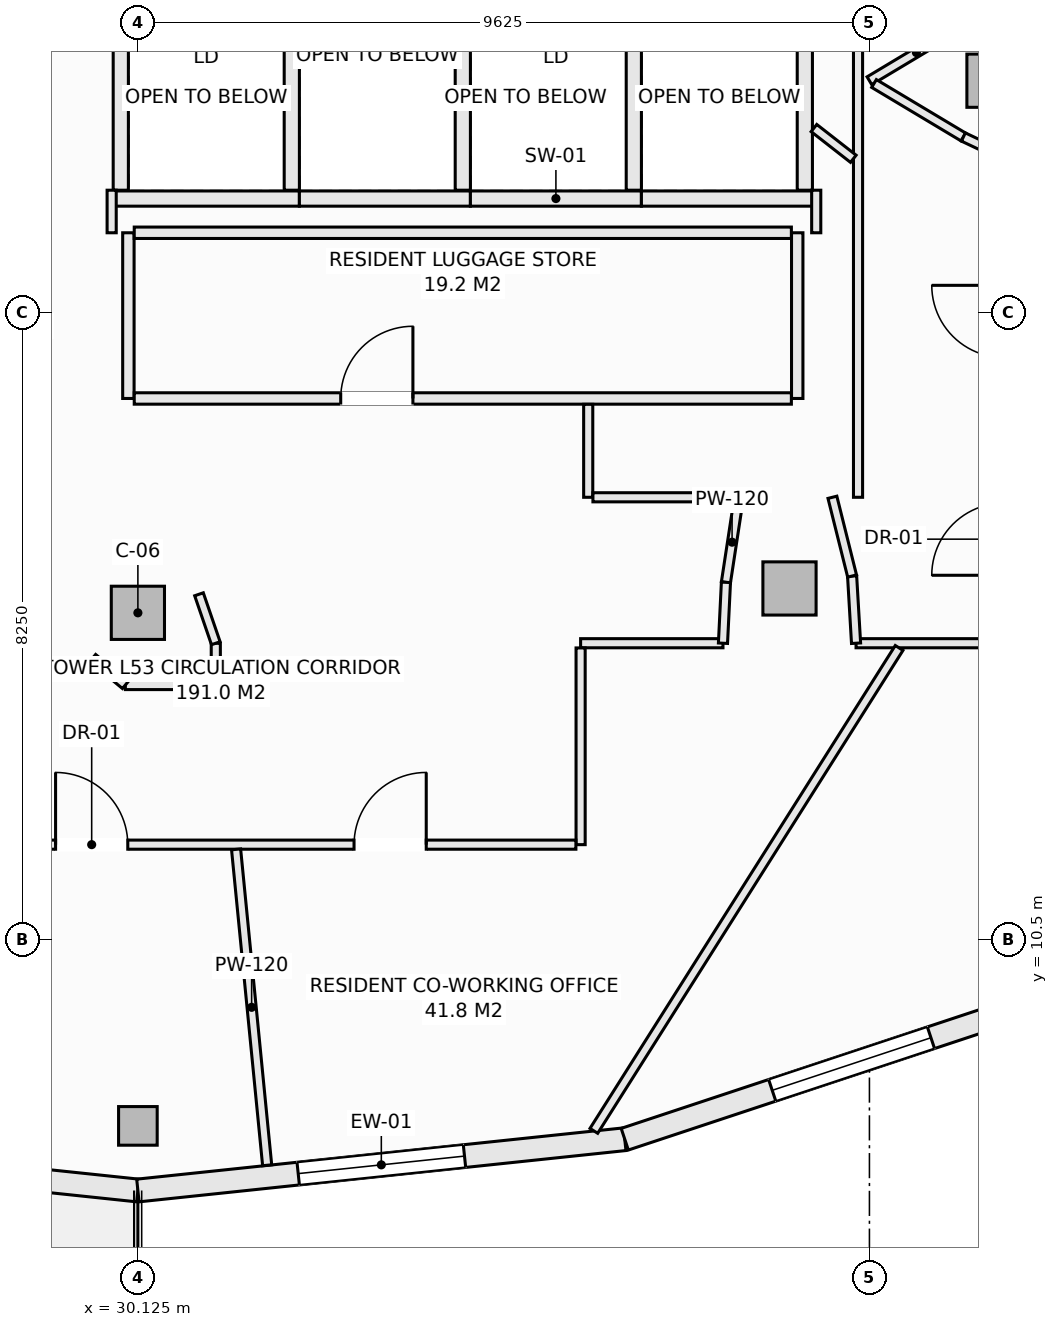
"""IFC4 building model, lengths in metres.
Left out: names, types, materials, properties, quantities, classifications, styles, units other than length and angle.
Written with IfcOpenShell. Run it as: python <this file> out.ifc"""

import sys

from ifc_helpers import new_model, si_unit, direction, frame, frame_2d, origin, origin_2d, place, context, subcontext, project, spatial, rectangle, hollow_rectangle, extrude, element, fill, save


model = new_model("IFC4")
c1 = context("Model", 3, precision=1e-05, world=origin(), true_north=direction((0.0, 1.0)))
c2 = subcontext(c1, "Body", "Model", "MODEL_VIEW")
j1 = project(units=[si_unit("LENGTHUNIT", "METRE"), si_unit("PLANEANGLEUNIT", "RADIAN")], contexts=[c1])
p1 = place(None, origin())
s1 = spatial("IfcSite", under=j1, at=p1, CompositionType="ELEMENT")
p2 = place(p1, origin())
s2 = spatial("IfcBuilding", under=s1, at=p2, CompositionType="ELEMENT")
p3 = place(p2, frame((0.0, 0.0, 203.0)))
s3 = spatial("IfcBuildingStorey", under=s2, at=p3, CompositionType="ELEMENT", Elevation=203.0)
p4 = place(p3, frame((30.125, 8.05, -0.27), z_axis=(0.0, 0.0, 1.0), x_axis=(1.0, 0.0, 0.0)))
e1 = element("IfcColumn", 1, at=p4, inside=s3, PredefinedType="COLUMN", context=c2, shape_type="SweptSolid", body=[
    extrude(hollow_rectangle(XDim=0.508, YDim=0.508, WallThickness=0.019, at=origin_2d()), origin(), (0.0, 0.0, 1.0), 3.3),
])
for number, where, z_axis, x_axis in (
    (2, (30.125, 14.8, -0.27), (0.0, 0.0, 1.0), (1.0, 0.0, 0.0)),
    (3, (38.698, 15.121, -0.27), (0.0, 0.0, 1.0), (1.0, 0.0, 0.0)),
    (4, (41.382, 21.801, -0.27), (0.0, 0.0, 1.0), (1.0, 0.0, 0.0)),
):
    element("IfcColumn", number, at=place(p3, frame(where, z_axis=z_axis, x_axis=x_axis)), inside=s3, PredefinedType="COLUMN", context=c2, shape_type="SweptSolid", body=[
        extrude(rectangle(XDim=0.7, YDim=0.7, at=origin_2d()), origin(), (0.0, 0.0, 1.0), 3.3),
    ])
p5 = place(p3, frame((23.719, 7.875, 0.0), z_axis=(0.0, 0.0, 1.0), x_axis=(0.994497142298, -0.104763705363, 0.0)))
e5 = element("IfcWall", 5, at=p5, inside=s3, PredefinedType="SOLIDWALL", context=c2, shape_type="SweptSolid", body=[
    extrude(rectangle(XDim=6.441, YDim=0.3, at=frame_2d((3.221, 0.0))), origin(), (0.0, 0.0, 1.0), 2.605),
])
p6 = place(p5, frame((2.121, 0.0, 0.72)))
e6 = element("IfcOpeningElement", 6, at=p6, cuts=e5, PredefinedType="OPENING", context=c2, shape_type="SweptSolid", body=[
    extrude(rectangle(XDim=2.2, YDim=1.65, at=frame_2d((1.1, 0.825))), frame((0.0, 0.16, 0.0), z_axis=(0.0, -1.0, 0.0), x_axis=(1.0, 0.0, 0.0)), (0.0, 0.0, 1.0), 0.32),
])
p7 = place(p3, frame((30.125, 7.2, 0.0), z_axis=(0.0, 0.0, 1.0), x_axis=(0.994497142298, 0.104763705363, 0.0)))
e7 = element("IfcWall", 7, at=p7, inside=s3, PredefinedType="SOLIDWALL", context=c2, shape_type="SweptSolid", body=[
    extrude(rectangle(XDim=6.441, YDim=0.3, at=frame_2d((3.221, 0.0))), origin(), (0.0, 0.0, 1.0), 2.605),
])
p8 = place(p7, frame((2.121, 0.0, 0.72)))
e8 = element("IfcOpeningElement", 8, at=p8, cuts=e7, PredefinedType="OPENING", context=c2, shape_type="SweptSolid", body=[
    extrude(rectangle(XDim=2.2, YDim=1.65, at=frame_2d((1.1, 0.825))), frame((0.0, 0.16, 0.0), z_axis=(0.0, -1.0, 0.0), x_axis=(1.0, 0.0, 0.0)), (0.0, 0.0, 1.0), 0.32),
])
p9 = place(p3, frame((36.531, 7.875, 0.0), z_axis=(0.0, 0.0, 1.0), x_axis=(0.949240877604, 0.314550085495, 0.0)))
e9 = element("IfcWall", 9, at=p9, inside=s3, PredefinedType="SOLIDWALL", context=c2, shape_type="SweptSolid", body=[
    extrude(rectangle(XDim=6.288, YDim=0.3, at=frame_2d((3.144, 0.0))), origin(), (0.0, 0.0, 1.0), 2.605),
])
p10 = place(p9, frame((2.044, 0.0, 0.72)))
e10 = element("IfcOpeningElement", 10, at=p10, cuts=e9, PredefinedType="OPENING", context=c2, shape_type="SweptSolid", body=[
    extrude(rectangle(XDim=2.2, YDim=1.65, at=frame_2d((1.1, 0.825))), frame((0.0, 0.16, 0.0), z_axis=(0.0, -1.0, 0.0), x_axis=(1.0, 0.0, 0.0)), (0.0, 0.0, 1.0), 0.32),
])
p11 = place(p3, frame((29.8, 20.25, 0.0), z_axis=(0.0, 0.0, 1.0), x_axis=(1.0, 0.0, 0.0)))
e11 = element("IfcWall", 11, at=p11, inside=s3, PredefinedType="SOLIDWALL", context=c2, shape_type="SweptSolid", body=[
    extrude(rectangle(XDim=2.45, YDim=0.2, at=frame_2d((1.225, 0.0))), origin(), (0.0, 0.0, 1.0), 3.03),
])
for number, where, z_axis, x_axis in (
    (12, (29.9, 20.36, 0.0), (0.0, 0.0, 1.0), (0.0, 1.0, 0.0)),
    (13, (32.15, 20.36, 0.0), (0.0, 0.0, 1.0), (0.0, 1.0, 0.0)),
):
    element("IfcWall", number, at=place(p3, frame(where, z_axis=z_axis, x_axis=x_axis)), inside=s3, PredefinedType="SOLIDWALL", context=c2, shape_type="SweptSolid", body=[
        extrude(rectangle(XDim=2.43, YDim=0.2, at=frame_2d((1.215, 0.0))), origin(), (0.0, 0.0, 1.0), 3.03),
    ])
p12 = place(p3, frame((32.25, 20.25, 0.0), z_axis=(0.0, 0.0, 1.0), x_axis=(1.0, 0.0, 0.0)))
e14 = element("IfcWall", 14, at=p12, inside=s3, PredefinedType="SOLIDWALL", context=c2, shape_type="SweptSolid", body=[
    extrude(rectangle(XDim=2.25, YDim=0.2, at=frame_2d((1.125, 0.0))), origin(), (0.0, 0.0, 1.0), 3.03),
])
p13 = place(p3, frame((34.4, 20.36, 0.0), z_axis=(0.0, 0.0, 1.0), x_axis=(0.0, 1.0, 0.0)))
e15 = element("IfcWall", 15, at=p13, inside=s3, PredefinedType="SOLIDWALL", context=c2, shape_type="SweptSolid", body=[
    extrude(rectangle(XDim=2.43, YDim=0.2, at=frame_2d((1.215, 0.0))), origin(), (0.0, 0.0, 1.0), 3.03),
])
p14 = place(p3, frame((34.5, 20.25, 0.0), z_axis=(0.0, 0.0, 1.0), x_axis=(1.0, 0.0, 0.0)))
e16 = element("IfcWall", 16, at=p14, inside=s3, PredefinedType="SOLIDWALL", context=c2, shape_type="SweptSolid", body=[
    extrude(rectangle(XDim=2.25, YDim=0.2, at=frame_2d((1.125, 0.0))), origin(), (0.0, 0.0, 1.0), 3.03),
])
p15 = place(p3, frame((36.65, 20.36, 0.0), z_axis=(0.0, 0.0, 1.0), x_axis=(0.0, 1.0, 0.0)))
e17 = element("IfcWall", 17, at=p15, inside=s3, PredefinedType="SOLIDWALL", context=c2, shape_type="SweptSolid", body=[
    extrude(rectangle(XDim=2.43, YDim=0.2, at=frame_2d((1.215, 0.0))), origin(), (0.0, 0.0, 1.0), 3.03),
])
p16 = place(p3, frame((36.75, 20.25, 0.0), z_axis=(0.0, 0.0, 1.0), x_axis=(1.0, 0.0, 0.0)))
e18 = element("IfcWall", 18, at=p16, inside=s3, PredefinedType="SOLIDWALL", context=c2, shape_type="SweptSolid", body=[
    extrude(rectangle(XDim=2.25, YDim=0.2, at=frame_2d((1.125, 0.0))), origin(), (0.0, 0.0, 1.0), 3.03),
])
p17 = place(p3, frame((38.9, 20.36, 0.0), z_axis=(0.0, 0.0, 1.0), x_axis=(0.0, 1.0, 0.0)))
e19 = element("IfcWall", 19, at=p17, inside=s3, PredefinedType="SOLIDWALL", context=c2, shape_type="SweptSolid", body=[
    extrude(rectangle(XDim=2.43, YDim=0.2, at=frame_2d((1.215, 0.0))), origin(), (0.0, 0.0, 1.0), 3.03),
])
for number, where, z_axis, x_axis in (
    (20, (30.0, 17.62, 0.0), (0.0, 0.0, 1.0), (0.0, 1.0, 0.0)),
    (21, (38.8, 17.62, 0.0), (0.0, 0.0, 1.0), (0.0, 1.0, 0.0)),
):
    element("IfcWall", number, at=place(p3, frame(where, z_axis=z_axis, x_axis=x_axis)), inside=s3, PredefinedType="PARTITIONING", context=c2, shape_type="SweptSolid", body=[
        extrude(rectangle(XDim=2.18, YDim=0.15, at=frame_2d((1.09, 0.0))), origin(), (0.0, 0.0, 1.0), 3.03),
    ])
p18 = place(p3, frame((30.077, 17.62, 0.0), z_axis=(0.0, 0.0, 1.0), x_axis=(1.0, 0.0, 0.0)))
e22 = element("IfcWall", 22, at=p18, inside=s3, PredefinedType="PARTITIONING", context=c2, shape_type="SweptSolid", body=[
    extrude(rectangle(XDim=8.646, YDim=0.15, at=frame_2d((4.323, 0.0))), origin(), (0.0, 0.0, 1.0), 3.03),
])
p19 = place(p18, frame((2.717, 0.0, 0.0)))
e23 = element("IfcOpeningElement", 23, at=p19, cuts=e22, PredefinedType="OPENING", context=c2, shape_type="SweptSolid", body=[
    extrude(rectangle(XDim=0.95, YDim=2.1, at=frame_2d((0.475, 1.05))), frame((0.0, 0.085, 0.0), z_axis=(0.0, -1.0, 0.0), x_axis=(1.0, 0.0, 0.0)), (0.0, 0.0, 1.0), 0.17),
])
p20 = place(p3, frame((30.077, 19.8, 0.0), z_axis=(0.0, 0.0, 1.0), x_axis=(1.0, 0.0, 0.0)))
e24 = element("IfcWall", 24, at=p20, inside=s3, PredefinedType="PARTITIONING", context=c2, shape_type="SweptSolid", body=[
    extrude(rectangle(XDim=8.646, YDim=0.15, at=frame_2d((4.323, 0.0))), origin(), (0.0, 0.0, 1.0), 3.03),
])
p21 = place(p3, frame((39.05, 19.8, 0.0), z_axis=(0.0, 0.0, 1.0), x_axis=(0.0, 1.0, 0.0)))
e25 = element("IfcWall", 25, at=p21, inside=s3, PredefinedType="PARTITIONING", context=c2, shape_type="SweptSolid", body=[
    extrude(rectangle(XDim=0.56, YDim=0.12, at=frame_2d((0.28, 0.0))), origin(), (0.0, 0.0, 1.0), 3.03),
])
p22 = place(p3, frame((39.6, 16.32, 0.0), z_axis=(0.0, 0.0, 1.0), x_axis=(0.0, 1.0, 0.0)))
e26 = element("IfcWall", 26, at=p22, inside=s3, PredefinedType="PARTITIONING", context=c2, shape_type="SweptSolid", body=[
    extrude(rectangle(XDim=6.7, YDim=0.12, at=frame_2d((3.35, 0.0))), origin(), (0.0, 0.0, 1.0), 2.478),
])
p23 = place(p3, frame((39.75, 21.8, 0.0), z_axis=(0.0, 0.0, 1.0), x_axis=(0.857702120906, 0.514146935996, 0.0)))
e27 = element("IfcWall", 27, at=p23, inside=s3, PredefinedType="PARTITIONING", context=c2, shape_type="SweptSolid", body=[
    extrude(rectangle(XDim=1.441, YDim=0.12, at=frame_2d((0.721, 0.0))), origin(), (0.0, 0.0, 1.0), 3.03),
])
p24 = place(p3, frame((39.81, 21.764, 0.0), z_axis=(0.0, 0.0, 1.0), x_axis=(0.858011245414, -0.513630901273, 0.0)))
e28 = element("IfcWall", 28, at=p24, inside=s3, PredefinedType="PARTITIONING", context=c2, shape_type="SweptSolid", body=[
    extrude(rectangle(XDim=1.37, YDim=0.12, at=frame_2d((0.685, 0.0))), origin(), (0.0, 0.0, 1.0), 3.03),
])
p25 = place(p3, frame((40.986, 21.06, 0.0), z_axis=(0.0, 0.0, 1.0), x_axis=(0.90356951601, -0.428441512621, 0.0)))
e29 = element("IfcWall", 29, at=p25, inside=s3, PredefinedType="PARTITIONING", context=c2, shape_type="SweptSolid", body=[
    extrude(rectangle(XDim=0.591, YDim=0.12, at=frame_2d((0.295, 0.0))), origin(), (0.0, 0.0, 1.0), 3.03),
])
p26 = place(p3, frame((35.95, 14.4, 0.0), z_axis=(0.0, 0.0, 1.0), x_axis=(1.0, 0.0, 0.0)))
e30 = element("IfcWall", 30, at=p26, inside=s3, PredefinedType="PARTITIONING", context=c2, shape_type="SweptSolid", body=[
    extrude(rectangle(XDim=1.873, YDim=0.12, at=frame_2d((0.937, 0.0))), origin(), (0.0, 0.0, 1.0), 3.03),
])
p27 = place(p3, frame((39.574, 14.4, 0.0), z_axis=(0.0, 0.0, 1.0), x_axis=(1.0, 0.0, 0.0)))
e31 = element("IfcWall", 31, at=p27, inside=s3, PredefinedType="PARTITIONING", context=c2, shape_type="SweptSolid", body=[
    extrude(rectangle(XDim=1.884, YDim=0.12, at=frame_2d((0.942, 0.0))), origin(), (0.0, 0.0, 1.0), 3.03),
])
p28 = place(p3, frame((39.522, 15.284, 0.0), z_axis=(0.0, 0.0, 1.0), x_axis=(0.058722021951, -0.998274373175, 0.0)))
e32 = element("IfcWall", 32, at=p28, inside=s3, PredefinedType="PARTITIONING", context=c2, shape_type="SweptSolid", body=[
    extrude(rectangle(XDim=0.885, YDim=0.12, at=frame_2d((0.443, 0.0))), origin(), (0.0, 0.0, 1.0), 3.03),
])
p29 = place(p3, frame((39.263, 16.32, 0.0), z_axis=(0.0, 0.0, 1.0), x_axis=(0.242535625036, -0.970142500145, 0.0)))
e33 = element("IfcWall", 33, at=p29, inside=s3, PredefinedType="PARTITIONING", context=c2, shape_type="SweptSolid", body=[
    extrude(rectangle(XDim=1.068, YDim=0.12, at=frame_2d((0.534, 0.0))), origin(), (0.0, 0.0, 1.0), 2.478),
])
p30 = place(p3, frame((29.78, 19.8, 0.0), z_axis=(0.0, 0.0, 1.0), x_axis=(0.0, 1.0, 0.0)))
e34 = element("IfcWall", 34, at=p30, inside=s3, PredefinedType="PARTITIONING", context=c2, shape_type="SweptSolid", body=[
    extrude(rectangle(XDim=0.56, YDim=0.12, at=frame_2d((0.28, 0.0))), origin(), (0.0, 0.0, 1.0), 3.03),
])
p31 = place(p3, frame((36.05, 16.32, 0.0), z_axis=(0.0, 0.0, 1.0), x_axis=(0.0, 1.0, 0.0)))
e35 = element("IfcWall", 35, at=p31, inside=s3, PredefinedType="PARTITIONING", context=c2, shape_type="SweptSolid", body=[
    extrude(rectangle(XDim=1.223, YDim=0.12, at=frame_2d((0.611, 0.0))), origin(), (0.0, 0.0, 1.0), 3.03),
])
p32 = place(p3, frame((36.112, 16.32, 0.0), z_axis=(0.0, 0.0, 1.0), x_axis=(1.0, 0.0, 0.0)))
e36 = element("IfcWall", 36, at=p32, inside=s3, PredefinedType="PARTITIONING", context=c2, shape_type="SweptSolid", body=[
    extrude(rectangle(XDim=1.921, YDim=0.12, at=frame_2d((0.96, 0.0))), origin(), (0.0, 0.0, 1.0), 3.03),
])
p33 = place(p3, frame((37.862, 15.201, 0.0), z_axis=(0.0, 0.0, 1.0), x_axis=(0.150907653202, 0.988547864398, 0.0)))
e37 = element("IfcWall", 37, at=p33, inside=s3, PredefinedType="PARTITIONING", context=c2, shape_type="SweptSolid", body=[
    extrude(rectangle(XDim=1.069, YDim=0.12, at=frame_2d((0.535, 0.0))), origin(), (0.0, 0.0, 1.0), 3.03),
])
p34 = place(p3, frame((37.823, 14.4, 0.0), z_axis=(0.0, 0.0, 1.0), x_axis=(0.04870773904, 0.998813073682, 0.0)))
e38 = element("IfcWall", 38, at=p34, inside=s3, PredefinedType="PARTITIONING", context=c2, shape_type="SweptSolid", body=[
    extrude(rectangle(XDim=0.802, YDim=0.12, at=frame_2d((0.401, 0.0))), origin(), (0.0, 0.0, 1.0), 3.03),
])
p35 = place(p3, frame((35.95, 11.75, 0.0), z_axis=(0.0, 0.0, 1.0), x_axis=(0.0, 1.0, 0.0)))
e39 = element("IfcWall", 39, at=p35, inside=s3, PredefinedType="PARTITIONING", context=c2, shape_type="SweptSolid", body=[
    extrude(rectangle(XDim=2.588, YDim=0.12, at=frame_2d((1.294, 0.0))), origin(), (0.0, 0.0, 1.0), 3.03),
])
p36 = place(p3, frame((27.212, 11.75, 0.0), z_axis=(0.0, 0.0, 1.0), x_axis=(1.0, 0.0, 0.0)))
e40 = element("IfcWall", 40, at=p36, inside=s3, PredefinedType="PARTITIONING", context=c2, shape_type="SweptSolid", body=[
    extrude(rectangle(XDim=8.676, YDim=0.12, at=frame_2d((4.338, 0.0))), origin(), (0.0, 0.0, 1.0), 3.03),
])
p37 = place(p36, frame((1.83, 0.0, 0.0)))
e41 = element("IfcOpeningElement", 41, at=p37, cuts=e40, PredefinedType="OPENING", context=c2, shape_type="SweptSolid", body=[
    extrude(rectangle(XDim=0.95, YDim=2.1, at=frame_2d((0.475, 1.05))), frame((0.0, 0.07, 0.0), z_axis=(0.0, -1.0, 0.0), x_axis=(1.0, 0.0, 0.0)), (0.0, 0.0, 1.0), 0.14),
])
p38 = place(p36, frame((5.757, 0.0, 0.0)))
e42 = element("IfcOpeningElement", 42, at=p38, cuts=e40, PredefinedType="OPENING", context=c2, shape_type="SweptSolid", body=[
    extrude(rectangle(XDim=0.95, YDim=2.1, at=frame_2d((0.475, 1.05))), frame((0.0, 0.07, 0.0), z_axis=(0.0, -1.0, 0.0), x_axis=(1.0, 0.0, 0.0)), (0.0, 0.0, 1.0), 0.14),
])
p39 = place(p3, frame((29.96, 13.85, 0.0), z_axis=(0.0, 0.0, 1.0), x_axis=(1.0, 0.0, 0.0)))
e43 = element("IfcWall", 43, at=p39, inside=s3, PredefinedType="PARTITIONING", context=c2, shape_type="SweptSolid", body=[
    extrude(rectangle(XDim=1.19, YDim=0.12, at=frame_2d((0.595, 0.0))), origin(), (0.0, 0.0, 1.0), 3.03),
])
p40 = place(p3, frame((31.15, 13.912, 0.0), z_axis=(0.0, 0.0, 1.0), x_axis=(0.0, 1.0, 0.0)))
e44 = element("IfcWall", 44, at=p40, inside=s3, PredefinedType="PARTITIONING", context=c2, shape_type="SweptSolid", body=[
    extrude(rectangle(XDim=0.488, YDim=0.12, at=frame_2d((0.244, 0.0))), origin(), (0.0, 0.0, 1.0), 3.03),
])
p41 = place(p3, frame((30.929, 15.044, 0.0), z_axis=(0.0, 0.0, 1.0), x_axis=(0.324498492416, -0.945886213252, 0.0)))
e45 = element("IfcWall", 45, at=p41, inside=s3, PredefinedType="PARTITIONING", context=c2, shape_type="SweptSolid", body=[
    extrude(rectangle(XDim=0.681, YDim=0.12, at=frame_2d((0.34, 0.0))), origin(), (0.0, 0.0, 1.0), 3.03),
])
p42 = place(p3, frame((29.531, 14.206, 0.0), z_axis=(0.0, 0.0, 1.0), x_axis=(0.7695479554, -0.638589026166, 0.0)))
e46 = element("IfcWall", 46, at=p42, inside=s3, PredefinedType="PARTITIONING", context=c2, shape_type="SweptSolid", body=[
    extrude(rectangle(XDim=0.557, YDim=0.12, at=frame_2d((0.279, 0.0))), origin(), (0.0, 0.0, 1.0), 3.03),
])
p43 = place(p3, frame((31.417, 11.688, 0.0), z_axis=(0.0, 0.0, 1.0), x_axis=(0.097923390467, -0.995193955769, 0.0)))
e47 = element("IfcWall", 47, at=p43, inside=s3, PredefinedType="PARTITIONING", context=c2, shape_type="SweptSolid", body=[
    extrude(rectangle(XDim=4.176, YDim=0.12, at=frame_2d((2.088, 0.0))), origin(), (0.0, 0.0, 1.0), 3.03),
])
p44 = place(p3, frame((39.02, 21.178, 0.0), z_axis=(0.0, 0.0, 1.0), x_axis=(0.788170760396, -0.615456621101, 0.0)))
e48 = element("IfcWall", 48, at=p44, inside=s3, PredefinedType="PARTITIONING", context=c2, shape_type="SweptSolid", body=[
    extrude(rectangle(XDim=0.657, YDim=0.12, at=frame_2d((0.329, 0.0))), origin(), (0.0, 0.0, 1.0), 3.03),
])
p45 = place(p3, frame((36.124, 7.985, 0.0), z_axis=(0.0, 0.0, 1.0), x_axis=(0.534397421847, 0.845233337915, 0.0)))
e49 = element("IfcWall", 49, at=p45, inside=s3, PredefinedType="PARTITIONING", context=c2, shape_type="SweptSolid", body=[
    extrude(rectangle(XDim=7.517, YDim=0.12, at=frame_2d((3.758, 0.0))), origin(), (0.0, 0.0, 1.0), 3.03),
])
p46 = place(p8, origin())
e50 = element("IfcWindow", 50, at=p46, inside=s3, PartitioningType="SINGLE_PANEL", PredefinedType="WINDOW", context=c2, shape_type="SweptSolid", body=[
    extrude(rectangle(XDim=2.2, YDim=1.65, at=frame_2d((1.1, 0.825))), frame((0.0, 0.03, 0.0), z_axis=(0.0, -1.0, 0.0), x_axis=(1.0, 0.0, 0.0)), (0.0, 0.0, 1.0), 0.06),
])
fill(e8, e50)
p47 = place(p10, origin())
e51 = element("IfcWindow", 51, at=p47, inside=s3, PartitioningType="SINGLE_PANEL", PredefinedType="WINDOW", context=c2, shape_type="SweptSolid", body=[
    extrude(rectangle(XDim=2.2, YDim=1.65, at=frame_2d((1.1, 0.825))), frame((0.0, 0.03, 0.0), z_axis=(0.0, -1.0, 0.0), x_axis=(1.0, 0.0, 0.0)), (0.0, 0.0, 1.0), 0.06),
])
fill(e10, e51)
p48 = place(p19, origin())
e52 = element("IfcDoor", 52, at=p48, inside=s3, OperationType="SINGLE_SWING_RIGHT", PredefinedType="DOOR", context=c2, shape_type="SweptSolid", body=[
    extrude(rectangle(XDim=0.95, YDim=2.1, at=frame_2d((0.475, 1.05))), frame((0.0, 0.025, 0.0), z_axis=(0.0, -1.0, 0.0), x_axis=(1.0, 0.0, 0.0)), (0.0, 0.0, 1.0), 0.05),
])
fill(e23, e52)
p49 = place(p37, origin())
e53 = element("IfcDoor", 53, at=p49, inside=s3, OperationType="SINGLE_SWING_LEFT", PredefinedType="DOOR", context=c2, shape_type="SweptSolid", body=[
    extrude(rectangle(XDim=0.95, YDim=2.1, at=frame_2d((0.475, 1.05))), frame((0.0, 0.025, 0.0), z_axis=(0.0, -1.0, 0.0), x_axis=(1.0, 0.0, 0.0)), (0.0, 0.0, 1.0), 0.05),
])
fill(e41, e53)
p50 = place(p38, origin())
e54 = element("IfcDoor", 54, at=p50, inside=s3, OperationType="SINGLE_SWING_RIGHT", PredefinedType="DOOR", context=c2, shape_type="SweptSolid", body=[
    extrude(rectangle(XDim=0.95, YDim=2.1, at=frame_2d((0.475, 1.05))), frame((0.0, 0.025, 0.0), z_axis=(0.0, -1.0, 0.0), x_axis=(1.0, 0.0, 0.0)), (0.0, 0.0, 1.0), 0.05),
])
fill(e42, e54)
save(model, sys.argv[1])
